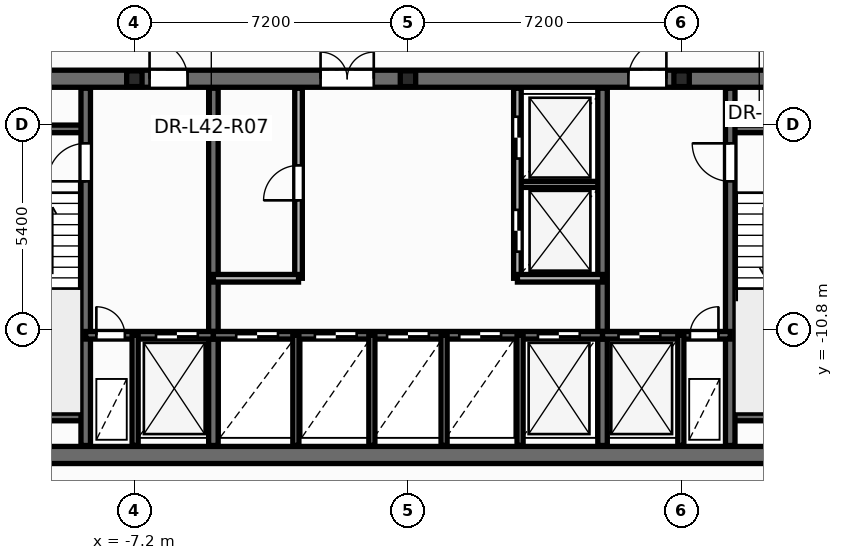
"""IFC4 building model, lengths in metres.
Left out: names, types, materials, properties, quantities, classifications, styles, units other than length and angle.
Written with IfcOpenShell. Run it as: python <this file> out.ifc"""

import sys

from ifc_helpers import new_model, si_unit, direction, frame, frame_2d, origin, origin_2d, place, context, subcontext, project, spatial, rectangle, i_section, extrude, element, fill, save


model = new_model("IFC4")
c1 = context("Model", 3, precision=1e-05, world=origin(), true_north=direction((0.0, 1.0)))
c2 = subcontext(c1, "Body", "Model", "MODEL_VIEW")
j1 = project(units=[si_unit("LENGTHUNIT", "METRE"), si_unit("PLANEANGLEUNIT", "RADIAN")], contexts=[c1])
p1 = place(None, origin())
s1 = spatial("IfcSite", under=j1, at=p1, CompositionType="ELEMENT")
p2 = place(p1, origin())
s2 = spatial("IfcBuilding", under=s1, at=p2, CompositionType="ELEMENT")
p3 = place(p2, frame((0.0, 0.0, 161.7)))
s3 = spatial("IfcBuildingStorey", under=s2, at=p3, CompositionType="ELEMENT", Elevation=161.7)
for number, where, z_axis, x_axis in (
    (1, (-7.2, -4.2, 0.0), (0.0, 0.0, 1.0), (1.0, 0.0, 0.0)),
    (2, (0.0, -4.2, 0.0), (0.0, 0.0, 1.0), (1.0, 0.0, 0.0)),
    (3, (7.2, -4.2, 0.0), (0.0, 0.0, 1.0), (1.0, 0.0, 0.0)),
):
    element("IfcColumn", number, at=place(p3, frame(where, z_axis=z_axis, x_axis=x_axis)), inside=s3, PredefinedType="PILASTER", context=c2, shape_type="SweptSolid", body=[
        extrude(i_section(OverallWidth=0.405, OverallDepth=0.414, WebThickness=0.022, FlangeThickness=0.032, at=origin_2d()), origin(), (0.0, 0.0, 1.0), 3.6),
    ])
p4 = place(p3, frame((2.88, -6.98, 0.0), z_axis=(0.0, 0.0, 1.0), x_axis=(1.0, 0.0, 0.0)))
e4 = element("IfcWall", 4, at=p4, inside=s3, PredefinedType="PARTITIONING", context=c2, shape_type="SweptSolid", body=[
    extrude(rectangle(XDim=2.24, YDim=0.16, at=frame_2d((1.12, 0.0))), origin(), (0.0, 0.0, 1.0), 3.35),
])
p5 = place(p3, frame((-12.65, -14.1, 0.0), z_axis=(0.0, 0.0, 1.0), x_axis=(1.0, 0.0, 0.0)))
e5 = element("IfcWall", 5, at=p5, inside=s3, PredefinedType="SHEAR", context=c2, shape_type="SweptSolid", body=[
    extrude(rectangle(XDim=25.3, YDim=0.45, at=frame_2d((12.65, 0.0))), origin(), (0.0, 0.0, 1.0), 3.6),
])
p6 = place(p3, frame((-12.65, -4.2, 0.0), z_axis=(0.0, 0.0, 1.0), x_axis=(1.0, 0.0, 0.0)))
e6 = element("IfcWall", 6, at=p6, inside=s3, PredefinedType="SHEAR", context=c2, shape_type="SweptSolid", body=[
    extrude(rectangle(XDim=25.3, YDim=0.45, at=frame_2d((12.65, 0.0))), origin(), (0.0, 0.0, 1.0), 3.6),
])
p7 = place(p6, frame((1.85, 0.0, 0.0)))
e7 = element("IfcOpeningElement", 7, at=p7, cuts=e6, PredefinedType="OPENING", context=c2, shape_type="SweptSolid", body=[
    extrude(rectangle(XDim=0.756, YDim=2.054, at=frame_2d((0.375, 1.027))), frame((0.0, 0.235, 0.0), z_axis=(0.0, -1.0, 0.0), x_axis=(1.0, 0.0, 0.0)), (0.0, 0.0, 1.0), 0.47),
])
p8 = place(p6, frame((22.65, 0.0, 0.0)))
e8 = element("IfcOpeningElement", 8, at=p8, cuts=e6, PredefinedType="OPENING", context=c2, shape_type="SweptSolid", body=[
    extrude(rectangle(XDim=0.756, YDim=2.054, at=frame_2d((0.375, 1.027))), frame((0.0, 0.235, 0.0), z_axis=(0.0, -1.0, 0.0), x_axis=(1.0, 0.0, 0.0)), (0.0, 0.0, 1.0), 0.47),
])
p9 = place(p6, frame((5.85, 0.0, 0.0)))
e9 = element("IfcOpeningElement", 9, at=p9, cuts=e6, PredefinedType="OPENING", context=c2, shape_type="SweptSolid", body=[
    extrude(rectangle(XDim=1.006, YDim=2.104, at=frame_2d((0.5, 1.052))), frame((0.0, 0.235, 0.0), z_axis=(0.0, -1.0, 0.0), x_axis=(1.0, 0.0, 0.0)), (0.0, 0.0, 1.0), 0.47),
])
p10 = place(p6, frame((10.35, 0.0, 0.0)))
e10 = element("IfcOpeningElement", 10, at=p10, cuts=e6, PredefinedType="OPENING", context=c2, shape_type="SweptSolid", body=[
    extrude(rectangle(XDim=1.406, YDim=2.154, at=frame_2d((0.7, 1.077))), frame((0.0, 0.235, 0.0), z_axis=(0.0, -1.0, 0.0), x_axis=(1.0, 0.0, 0.0)), (0.0, 0.0, 1.0), 0.47),
])
p11 = place(p6, frame((18.45, 0.0, 0.0)))
e11 = element("IfcOpeningElement", 11, at=p11, cuts=e6, PredefinedType="OPENING", context=c2, shape_type="SweptSolid", body=[
    extrude(rectangle(XDim=1.006, YDim=2.104, at=frame_2d((0.5, 1.052))), frame((0.0, 0.235, 0.0), z_axis=(0.0, -1.0, 0.0), x_axis=(1.0, 0.0, 0.0)), (0.0, 0.0, 1.0), 0.47),
])
for number, where, z_axis, x_axis in (
    (12, (-12.35, -5.52, 0.0), (0.0, 0.0, 1.0), (1.0, 0.0, 0.0)),
    (13, (-12.35, -13.1, 0.0), (0.0, 0.0, 1.0), (1.0, 0.0, 0.0)),
    (14, (8.48, -5.52, 0.0), (0.0, 0.0, 1.0), (1.0, 0.0, 0.0)),
    (15, (8.48, -13.1, 0.0), (0.0, 0.0, 1.0), (1.0, 0.0, 0.0)),
):
    element("IfcWall", number, at=place(p3, frame(where, z_axis=z_axis, x_axis=x_axis)), inside=s3, PredefinedType="SOLIDWALL", context=c2, shape_type="SweptSolid", body=[
        extrude(rectangle(XDim=3.87, YDim=0.2, at=frame_2d((1.935, 0.0))), origin(), (0.0, 0.0, 1.0), 3.6),
    ])
p12 = place(p3, frame((-8.48, -13.85, 0.0), z_axis=(0.0, 0.0, 1.0), x_axis=(0.0, 1.0, 0.0)))
e16 = element("IfcWall", 16, at=p12, inside=s3, PredefinedType="SHEAR", context=c2, shape_type="SweptSolid", body=[
    extrude(rectangle(XDim=9.4, YDim=0.25, at=frame_2d((4.7, 0.0))), origin(), (0.0, 0.0, 1.0), 3.6),
])
p13 = place(p12, frame((6.95, 0.0, 0.0)))
e17 = element("IfcOpeningElement", 17, at=p13, cuts=e16, PredefinedType="OPENING", context=c2, shape_type="SweptSolid", body=[
    extrude(rectangle(XDim=1.006, YDim=2.104, at=frame_2d((0.5, 1.052))), frame((0.0, 0.135, 0.0), z_axis=(0.0, -1.0, 0.0), x_axis=(1.0, 0.0, 0.0)), (0.0, 0.0, 1.0), 0.27),
])
p14 = place(p3, frame((8.48, -13.85, 0.0), z_axis=(0.0, 0.0, 1.0), x_axis=(0.0, 1.0, 0.0)))
e18 = element("IfcWall", 18, at=p14, inside=s3, PredefinedType="SHEAR", context=c2, shape_type="SweptSolid", body=[
    extrude(rectangle(XDim=9.4, YDim=0.25, at=frame_2d((4.7, 0.0))), origin(), (0.0, 0.0, 1.0), 3.6),
])
p15 = place(p14, frame((6.95, 0.0, 0.0)))
e19 = element("IfcOpeningElement", 19, at=p15, cuts=e18, PredefinedType="OPENING", context=c2, shape_type="SweptSolid", body=[
    extrude(rectangle(XDim=1.006, YDim=2.104, at=frame_2d((0.5, 1.052))), frame((0.0, 0.135, 0.0), z_axis=(0.0, -1.0, 0.0), x_axis=(1.0, 0.0, 0.0)), (0.0, 0.0, 1.0), 0.27),
])
for number, where, z_axis, x_axis in (
    (20, (-5.12, -13.85, 0.0), (0.0, 0.0, 1.0), (0.0, 1.0, 0.0)),
    (21, (5.12, -13.85, 0.0), (0.0, 0.0, 1.0), (0.0, 1.0, 0.0)),
):
    element("IfcWall", number, at=place(p3, frame(where, z_axis=z_axis, x_axis=x_axis)), inside=s3, PredefinedType="SHEAR", context=c2, shape_type="SweptSolid", body=[
        extrude(rectangle(XDim=9.4, YDim=0.25, at=frame_2d((4.7, 0.0))), origin(), (0.0, 0.0, 1.0), 3.6),
    ])
p16 = place(p3, frame((-8.48, -10.95, 0.0), z_axis=(0.0, 0.0, 1.0), x_axis=(1.0, 0.0, 0.0)))
e22 = element("IfcWall", 22, at=p16, inside=s3, PredefinedType="SOLIDWALL", context=c2, shape_type="SweptSolid", body=[
    extrude(rectangle(XDim=3.36, YDim=0.2, at=frame_2d((1.68, 0.0))), origin(), (0.0, 0.0, 1.0), 3.6),
])
p17 = place(p16, frame((0.28, 0.0, 0.0)))
e23 = element("IfcOpeningElement", 23, at=p17, cuts=e22, PredefinedType="OPENING", context=c2, shape_type="SweptSolid", body=[
    extrude(rectangle(XDim=0.756, YDim=2.054, at=frame_2d((0.375, 1.027))), frame((0.0, 0.11, 0.0), z_axis=(0.0, -1.0, 0.0), x_axis=(1.0, 0.0, 0.0)), (0.0, 0.0, 1.0), 0.22),
])
p18 = place(p16, frame((1.85, 0.0, 0.0)))
e24 = element("IfcOpeningElement", 24, at=p18, cuts=e22, PredefinedType="OPENING", context=c2, shape_type="SweptSolid", body=[
    extrude(rectangle(XDim=1.106, YDim=2.104, at=frame_2d((0.55, 1.052))), frame((0.0, 0.11, 0.0), z_axis=(0.0, -1.0, 0.0), x_axis=(1.0, 0.0, 0.0)), (0.0, 0.0, 1.0), 0.22),
])
p19 = place(p3, frame((-5.12, -10.95, 0.0), z_axis=(0.0, 0.0, 1.0), x_axis=(1.0, 0.0, 0.0)))
e25 = element("IfcWall", 25, at=p19, inside=s3, PredefinedType="SOLIDWALL", context=c2, shape_type="SweptSolid", body=[
    extrude(rectangle(XDim=10.24, YDim=0.2, at=frame_2d((5.12, 0.0))), origin(), (0.0, 0.0, 1.0), 3.6),
])
p20 = place(p19, frame((0.6, 0.0, 0.0)))
e26 = element("IfcOpeningElement", 26, at=p20, cuts=e25, PredefinedType="OPENING", context=c2, shape_type="SweptSolid", body=[
    extrude(rectangle(XDim=1.106, YDim=2.104, at=frame_2d((0.55, 1.052))), frame((0.0, 0.11, 0.0), z_axis=(0.0, -1.0, 0.0), x_axis=(1.0, 0.0, 0.0)), (0.0, 0.0, 1.0), 0.22),
])
p21 = place(p19, frame((2.67, 0.0, 0.0)))
e27 = element("IfcOpeningElement", 27, at=p21, cuts=e25, PredefinedType="OPENING", context=c2, shape_type="SweptSolid", body=[
    extrude(rectangle(XDim=1.106, YDim=2.104, at=frame_2d((0.55, 1.052))), frame((0.0, 0.11, 0.0), z_axis=(0.0, -1.0, 0.0), x_axis=(1.0, 0.0, 0.0)), (0.0, 0.0, 1.0), 0.22),
])
p22 = place(p19, frame((4.57, 0.0, 0.0)))
e28 = element("IfcOpeningElement", 28, at=p22, cuts=e25, PredefinedType="OPENING", context=c2, shape_type="SweptSolid", body=[
    extrude(rectangle(XDim=1.106, YDim=2.104, at=frame_2d((0.55, 1.052))), frame((0.0, 0.11, 0.0), z_axis=(0.0, -1.0, 0.0), x_axis=(1.0, 0.0, 0.0)), (0.0, 0.0, 1.0), 0.22),
])
p23 = place(p19, frame((6.47, 0.0, 0.0)))
e29 = element("IfcOpeningElement", 29, at=p23, cuts=e25, PredefinedType="OPENING", context=c2, shape_type="SweptSolid", body=[
    extrude(rectangle(XDim=1.106, YDim=2.104, at=frame_2d((0.55, 1.052))), frame((0.0, 0.11, 0.0), z_axis=(0.0, -1.0, 0.0), x_axis=(1.0, 0.0, 0.0)), (0.0, 0.0, 1.0), 0.22),
])
p24 = place(p19, frame((8.54, 0.0, 0.0)))
e30 = element("IfcOpeningElement", 30, at=p24, cuts=e25, PredefinedType="OPENING", context=c2, shape_type="SweptSolid", body=[
    extrude(rectangle(XDim=1.106, YDim=2.104, at=frame_2d((0.55, 1.052))), frame((0.0, 0.11, 0.0), z_axis=(0.0, -1.0, 0.0), x_axis=(1.0, 0.0, 0.0)), (0.0, 0.0, 1.0), 0.22),
])
p25 = place(p3, frame((5.12, -10.95, 0.0), z_axis=(0.0, 0.0, 1.0), x_axis=(1.0, 0.0, 0.0)))
e31 = element("IfcWall", 31, at=p25, inside=s3, PredefinedType="SOLIDWALL", context=c2, shape_type="SweptSolid", body=[
    extrude(rectangle(XDim=3.36, YDim=0.2, at=frame_2d((1.68, 0.0))), origin(), (0.0, 0.0, 1.0), 3.6),
])
p26 = place(p25, frame((0.42, 0.0, 0.0)))
e32 = element("IfcOpeningElement", 32, at=p26, cuts=e31, PredefinedType="OPENING", context=c2, shape_type="SweptSolid", body=[
    extrude(rectangle(XDim=1.106, YDim=2.104, at=frame_2d((0.55, 1.052))), frame((0.0, 0.11, 0.0), z_axis=(0.0, -1.0, 0.0), x_axis=(1.0, 0.0, 0.0)), (0.0, 0.0, 1.0), 0.22),
])
p27 = place(p25, frame((2.3, 0.0, 0.0)))
e33 = element("IfcOpeningElement", 33, at=p27, cuts=e31, PredefinedType="OPENING", context=c2, shape_type="SweptSolid", body=[
    extrude(rectangle(XDim=0.756, YDim=2.054, at=frame_2d((0.375, 1.027))), frame((0.0, 0.11, 0.0), z_axis=(0.0, -1.0, 0.0), x_axis=(1.0, 0.0, 0.0)), (0.0, 0.0, 1.0), 0.22),
])
for number, where, z_axis, x_axis in (
    (34, (-7.18, -13.85, 0.0), (0.0, 0.0, 1.0), (0.0, 1.0, 0.0)),
    (35, (7.18, -13.85, 0.0), (0.0, 0.0, 1.0), (0.0, 1.0, 0.0)),
    (36, (-2.95, -13.85, 0.0), (0.0, 0.0, 1.0), (0.0, 1.0, 0.0)),
    (37, (2.95, -13.85, 0.0), (0.0, 0.0, 1.0), (0.0, 1.0, 0.0)),
):
    element("IfcWall", number, at=place(p3, frame(where, z_axis=z_axis, x_axis=x_axis)), inside=s3, PredefinedType="PARTITIONING", context=c2, shape_type="SweptSolid", body=[
        extrude(rectangle(XDim=2.9, YDim=0.16, at=frame_2d((1.45, 0.0))), origin(), (0.0, 0.0, 1.0), 2.475),
    ])
p28 = place(p3, frame((-2.88, -9.45, 0.0), z_axis=(0.0, 0.0, 1.0), x_axis=(0.0, 1.0, 0.0)))
e38 = element("IfcWall", 38, at=p28, inside=s3, PredefinedType="SOLIDWALL", context=c2, shape_type="SweptSolid", body=[
    extrude(rectangle(XDim=5.0, YDim=0.2, at=frame_2d((2.5, 0.0))), origin(), (0.0, 0.0, 1.0), 3.35),
])
p29 = place(p28, frame((2.05, 0.0, 0.0)))
e39 = element("IfcOpeningElement", 39, at=p29, cuts=e38, PredefinedType="OPENING", context=c2, shape_type="SweptSolid", body=[
    extrude(rectangle(XDim=0.926, YDim=2.104, at=frame_2d((0.46, 1.052))), frame((0.0, 0.11, 0.0), z_axis=(0.0, -1.0, 0.0), x_axis=(1.0, 0.0, 0.0)), (0.0, 0.0, 1.0), 0.22),
])
p30 = place(p3, frame((-5.12, -9.45, 0.0), z_axis=(0.0, 0.0, 1.0), x_axis=(1.0, 0.0, 0.0)))
e40 = element("IfcWall", 40, at=p30, inside=s3, PredefinedType="SOLIDWALL", context=c2, shape_type="SweptSolid", body=[
    extrude(rectangle(XDim=2.24, YDim=0.2, at=frame_2d((1.12, 0.0))), origin(), (0.0, 0.0, 1.0), 3.35),
])
p31 = place(p3, frame((2.88, -9.45, 0.0), z_axis=(0.0, 0.0, 1.0), x_axis=(0.0, 1.0, 0.0)))
e41 = element("IfcWall", 41, at=p31, inside=s3, PredefinedType="SOLIDWALL", context=c2, shape_type="SweptSolid", body=[
    extrude(rectangle(XDim=5.0, YDim=0.2, at=frame_2d((2.5, 0.0))), origin(), (0.0, 0.0, 1.0), 3.35),
])
p32 = place(p31, frame((0.7, 0.0, 0.0)))
e42 = element("IfcOpeningElement", 42, at=p32, cuts=e41, PredefinedType="OPENING", context=c2, shape_type="SweptSolid", body=[
    extrude(rectangle(XDim=1.106, YDim=2.104, at=frame_2d((0.55, 1.052))), frame((0.0, 0.11, 0.0), z_axis=(0.0, -1.0, 0.0), x_axis=(1.0, 0.0, 0.0)), (0.0, 0.0, 1.0), 0.22),
])
p33 = place(p31, frame((3.15, 0.0, 0.0)))
e43 = element("IfcOpeningElement", 43, at=p33, cuts=e41, PredefinedType="OPENING", context=c2, shape_type="SweptSolid", body=[
    extrude(rectangle(XDim=1.106, YDim=2.104, at=frame_2d((0.55, 1.052))), frame((0.0, 0.11, 0.0), z_axis=(0.0, -1.0, 0.0), x_axis=(1.0, 0.0, 0.0)), (0.0, 0.0, 1.0), 0.22),
])
p34 = place(p3, frame((2.88, -9.45, 0.0), z_axis=(0.0, 0.0, 1.0), x_axis=(1.0, 0.0, 0.0)))
e44 = element("IfcWall", 44, at=p34, inside=s3, PredefinedType="SOLIDWALL", context=c2, shape_type="SweptSolid", body=[
    extrude(rectangle(XDim=2.24, YDim=0.2, at=frame_2d((1.12, 0.0))), origin(), (0.0, 0.0, 1.0), 3.35),
])
for number, where, z_axis, x_axis in (
    (45, (-0.95, -13.85, 0.0), (0.0, 0.0, 1.0), (0.0, 1.0, 0.0)),
    (46, (0.95, -13.85, 0.0), (0.0, 0.0, 1.0), (0.0, 1.0, 0.0)),
):
    element("IfcWall", number, at=place(p3, frame(where, z_axis=z_axis, x_axis=x_axis)), inside=s3, PredefinedType="PARTITIONING", context=c2, shape_type="SweptSolid", body=[
        extrude(rectangle(XDim=2.9, YDim=0.16, at=frame_2d((1.45, 0.0))), origin(), (0.0, 0.0, 1.0), 2.475),
    ])
p35 = place(p29, origin())
e47 = element("IfcDoor", 47, at=p35, inside=s3, OperationType="SINGLE_SWING_LEFT", PredefinedType="DOOR", context=c2, shape_type="SweptSolid", body=[
    extrude(rectangle(XDim=0.92, YDim=2.1, at=frame_2d((0.46, 1.05))), frame((0.0, 0.025, 0.0), z_axis=(0.0, -1.0, 0.0), x_axis=(1.0, 0.0, 0.0)), (0.0, 0.0, 1.0), 0.05),
])
fill(e39, e47)
p36 = place(p32, origin())
e48 = element("IfcDoor", 48, at=p36, inside=s3, OperationType="DOUBLE_DOOR_SLIDING", PredefinedType="DOOR", context=c2, shape_type="SweptSolid", body=[
    extrude(rectangle(XDim=1.1, YDim=2.1, at=frame_2d((0.55, 1.05))), frame((0.0, 0.025, 0.0), z_axis=(0.0, -1.0, 0.0), x_axis=(1.0, 0.0, 0.0)), (0.0, 0.0, 1.0), 0.05),
])
fill(e42, e48)
p37 = place(p33, origin())
e49 = element("IfcDoor", 49, at=p37, inside=s3, OperationType="DOUBLE_DOOR_SLIDING", PredefinedType="DOOR", context=c2, shape_type="SweptSolid", body=[
    extrude(rectangle(XDim=1.1, YDim=2.1, at=frame_2d((0.55, 1.05))), frame((0.0, 0.025, 0.0), z_axis=(0.0, -1.0, 0.0), x_axis=(1.0, 0.0, 0.0)), (0.0, 0.0, 1.0), 0.05),
])
fill(e43, e49)
p38 = place(p13, origin())
e50 = element("IfcDoor", 50, at=p38, inside=s3, OperationType="SINGLE_SWING_LEFT", PredefinedType="DOOR", context=c2, shape_type="SweptSolid", body=[
    extrude(rectangle(XDim=1.0, YDim=2.1, at=frame_2d((0.5, 1.05))), frame((0.0, 0.025, 0.0), z_axis=(0.0, -1.0, 0.0), x_axis=(1.0, 0.0, 0.0)), (0.0, 0.0, 1.0), 0.05),
])
fill(e17, e50)
p39 = place(p15, origin())
e51 = element("IfcDoor", 51, at=p39, inside=s3, OperationType="SINGLE_SWING_RIGHT", PredefinedType="DOOR", context=c2, shape_type="SweptSolid", body=[
    extrude(rectangle(XDim=1.0, YDim=2.1, at=frame_2d((0.5, 1.05))), frame((0.0, 0.025, 0.0), z_axis=(0.0, -1.0, 0.0), x_axis=(1.0, 0.0, 0.0)), (0.0, 0.0, 1.0), 0.05),
])
fill(e19, e51)
p40 = place(p17, origin())
e52 = element("IfcDoor", 52, at=p40, inside=s3, OperationType="SINGLE_SWING_LEFT", PredefinedType="DOOR", context=c2, shape_type="SweptSolid", body=[
    extrude(rectangle(XDim=0.75, YDim=2.05, at=frame_2d((0.375, 1.025))), frame((0.0, 0.025, 0.0), z_axis=(0.0, -1.0, 0.0), x_axis=(1.0, 0.0, 0.0)), (0.0, 0.0, 1.0), 0.05),
])
fill(e23, e52)
p41 = place(p18, origin())
e53 = element("IfcDoor", 53, at=p41, inside=s3, OperationType="DOUBLE_DOOR_SLIDING", PredefinedType="DOOR", context=c2, shape_type="SweptSolid", body=[
    extrude(rectangle(XDim=1.1, YDim=2.1, at=frame_2d((0.55, 1.05))), frame((0.0, 0.025, 0.0), z_axis=(0.0, -1.0, 0.0), x_axis=(1.0, 0.0, 0.0)), (0.0, 0.0, 1.0), 0.05),
])
fill(e24, e53)
p42 = place(p26, origin())
e54 = element("IfcDoor", 54, at=p42, inside=s3, OperationType="DOUBLE_DOOR_SLIDING", PredefinedType="DOOR", context=c2, shape_type="SweptSolid", body=[
    extrude(rectangle(XDim=1.1, YDim=2.1, at=frame_2d((0.55, 1.05))), frame((0.0, 0.025, 0.0), z_axis=(0.0, -1.0, 0.0), x_axis=(1.0, 0.0, 0.0)), (0.0, 0.0, 1.0), 0.05),
])
fill(e32, e54)
p43 = place(p27, origin())
e55 = element("IfcDoor", 55, at=p43, inside=s3, OperationType="SINGLE_SWING_RIGHT", PredefinedType="DOOR", context=c2, shape_type="SweptSolid", body=[
    extrude(rectangle(XDim=0.75, YDim=2.05, at=frame_2d((0.375, 1.025))), frame((0.0, 0.025, 0.0), z_axis=(0.0, -1.0, 0.0), x_axis=(1.0, 0.0, 0.0)), (0.0, 0.0, 1.0), 0.05),
])
fill(e33, e55)
p44 = place(p20, origin())
e56 = element("IfcDoor", 56, at=p44, inside=s3, OperationType="DOUBLE_DOOR_SLIDING", PredefinedType="DOOR", context=c2, shape_type="SweptSolid", body=[
    extrude(rectangle(XDim=1.1, YDim=2.1, at=frame_2d((0.55, 1.05))), frame((0.0, 0.025, 0.0), z_axis=(0.0, -1.0, 0.0), x_axis=(1.0, 0.0, 0.0)), (0.0, 0.0, 1.0), 0.05),
])
fill(e26, e56)
p45 = place(p21, origin())
e57 = element("IfcDoor", 57, at=p45, inside=s3, OperationType="DOUBLE_DOOR_SLIDING", PredefinedType="DOOR", context=c2, shape_type="SweptSolid", body=[
    extrude(rectangle(XDim=1.1, YDim=2.1, at=frame_2d((0.55, 1.05))), frame((0.0, 0.025, 0.0), z_axis=(0.0, -1.0, 0.0), x_axis=(1.0, 0.0, 0.0)), (0.0, 0.0, 1.0), 0.05),
])
fill(e27, e57)
p46 = place(p22, origin())
e58 = element("IfcDoor", 58, at=p46, inside=s3, OperationType="DOUBLE_DOOR_SLIDING", PredefinedType="DOOR", context=c2, shape_type="SweptSolid", body=[
    extrude(rectangle(XDim=1.1, YDim=2.1, at=frame_2d((0.55, 1.05))), frame((0.0, 0.025, 0.0), z_axis=(0.0, -1.0, 0.0), x_axis=(1.0, 0.0, 0.0)), (0.0, 0.0, 1.0), 0.05),
])
fill(e28, e58)
p47 = place(p23, origin())
e59 = element("IfcDoor", 59, at=p47, inside=s3, OperationType="DOUBLE_DOOR_SLIDING", PredefinedType="DOOR", context=c2, shape_type="SweptSolid", body=[
    extrude(rectangle(XDim=1.1, YDim=2.1, at=frame_2d((0.55, 1.05))), frame((0.0, 0.025, 0.0), z_axis=(0.0, -1.0, 0.0), x_axis=(1.0, 0.0, 0.0)), (0.0, 0.0, 1.0), 0.05),
])
fill(e29, e59)
p48 = place(p24, origin())
e60 = element("IfcDoor", 60, at=p48, inside=s3, OperationType="DOUBLE_DOOR_SLIDING", PredefinedType="DOOR", context=c2, shape_type="SweptSolid", body=[
    extrude(rectangle(XDim=1.1, YDim=2.1, at=frame_2d((0.55, 1.05))), frame((0.0, 0.025, 0.0), z_axis=(0.0, -1.0, 0.0), x_axis=(1.0, 0.0, 0.0)), (0.0, 0.0, 1.0), 0.05),
])
fill(e30, e60)
p49 = place(p9, origin())
e61 = element("IfcDoor", 61, at=p49, inside=s3, OperationType="SINGLE_SWING_LEFT", PredefinedType="DOOR", context=c2, shape_type="SweptSolid", body=[
    extrude(rectangle(XDim=1.0, YDim=2.1, at=frame_2d((0.5, 1.05))), frame((0.0, 0.025, 0.0), z_axis=(0.0, -1.0, 0.0), x_axis=(1.0, 0.0, 0.0)), (0.0, 0.0, 1.0), 0.05),
])
fill(e9, e61)
p50 = place(p10, origin())
e62 = element("IfcDoor", 62, at=p50, inside=s3, OperationType="DOUBLE_DOOR_SINGLE_SWING", PredefinedType="DOOR", context=c2, shape_type="SweptSolid", body=[
    extrude(rectangle(XDim=1.4, YDim=2.15, at=frame_2d((0.7, 1.075))), frame((0.0, 0.025, 0.0), z_axis=(0.0, -1.0, 0.0), x_axis=(1.0, 0.0, 0.0)), (0.0, 0.0, 1.0), 0.05),
])
fill(e10, e62)
p51 = place(p11, origin())
e63 = element("IfcDoor", 63, at=p51, inside=s3, OperationType="SINGLE_SWING_RIGHT", PredefinedType="DOOR", context=c2, shape_type="SweptSolid", body=[
    extrude(rectangle(XDim=1.0, YDim=2.1, at=frame_2d((0.5, 1.05))), frame((0.0, 0.025, 0.0), z_axis=(0.0, -1.0, 0.0), x_axis=(1.0, 0.0, 0.0)), (0.0, 0.0, 1.0), 0.05),
])
fill(e11, e63)
save(model, sys.argv[1])
